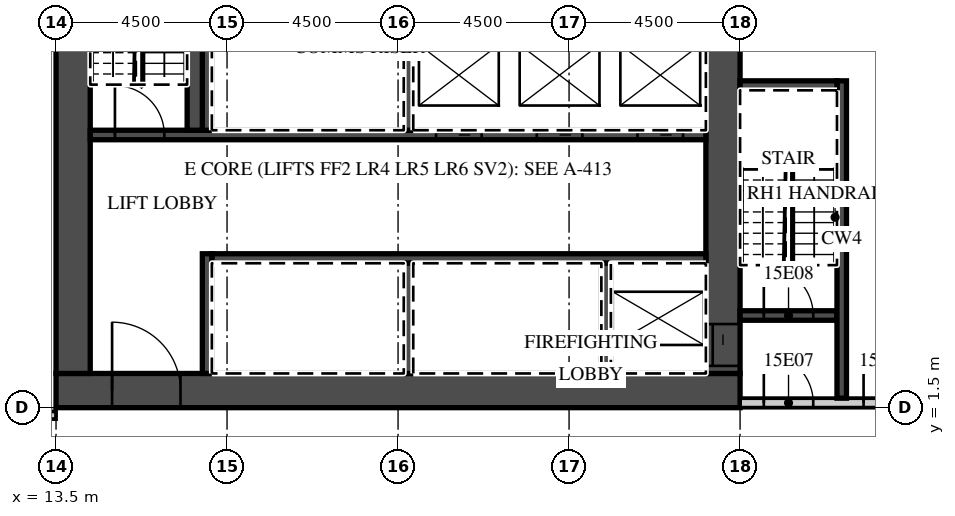
"""IFC4 building model, lengths in metres.
Left out: names, types, materials, properties, quantities, classifications, styles, units other than length and angle.
Written with IfcOpenShell. Run it as: python <this file> out.ifc"""

import sys

from ifc_helpers import new_model, si_unit, direction, frame, frame_2d, origin, place, context, subcontext, project, spatial, rectangle, extrude, element, fill, save


model = new_model("IFC4")
c1 = context("Model", 3, precision=1e-05, world=origin(), true_north=direction((0.0, 1.0)))
c2 = subcontext(c1, "Body", "Model", "MODEL_VIEW")
j1 = project(units=[si_unit("LENGTHUNIT", "METRE"), si_unit("PLANEANGLEUNIT", "RADIAN")], contexts=[c1])
p1 = place(None, origin())
s1 = spatial("IfcSite", under=j1, at=p1, CompositionType="ELEMENT")
p2 = place(p1, origin())
s2 = spatial("IfcBuilding", under=s1, at=p2, CompositionType="ELEMENT")
p3 = place(p2, frame((0.0, 0.0, 79.8)))
s3 = spatial("IfcBuildingStorey", under=s2, at=p3, CompositionType="ELEMENT", Elevation=79.8)
p4 = place(p3, frame((-44.55, 1.3, 0.0), z_axis=(0.0, 0.0, 1.0), x_axis=(1.0, 0.0, 0.0)))
e1 = element("IfcWall", 1, at=p4, inside=s3, PredefinedType="PARTITIONING", context=c2, shape_type="SweptSolid", body=[
    extrude(rectangle(XDim=58.05, YDim=0.2, at=frame_2d((29.025, 0.0))), origin(), (0.0, 0.0, 1.0), 3.02),
])
p5 = place(p4, frame((0.525, 0.0, 0.0)))
e2 = element("IfcOpeningElement", 2, at=p5, cuts=e1, PredefinedType="OPENING", context=c2, shape_type="SweptSolid", body=[
    extrude(rectangle(XDim=1.0, YDim=2.1, at=frame_2d((0.5, 1.05))), frame((0.0, 0.11, 0.0), z_axis=(0.0, -1.0, 0.0), x_axis=(1.0, 0.0, 0.0)), (0.0, 0.0, 1.0), 0.22),
])
p6 = place(p4, frame((4.625, 0.0, 0.0)))
e3 = element("IfcOpeningElement", 3, at=p6, cuts=e1, PredefinedType="OPENING", context=c2, shape_type="SweptSolid", body=[
    extrude(rectangle(XDim=1.0, YDim=2.1, at=frame_2d((0.5, 1.05))), frame((0.0, 0.11, 0.0), z_axis=(0.0, -1.0, 0.0), x_axis=(1.0, 0.0, 0.0)), (0.0, 0.0, 1.0), 0.22),
])
p7 = place(p4, frame((10.987, 0.0, 0.0)))
e4 = element("IfcOpeningElement", 4, at=p7, cuts=e1, PredefinedType="OPENING", context=c2, shape_type="SweptSolid", body=[
    extrude(rectangle(XDim=1.2, YDim=2.1, at=frame_2d((0.6, 1.05))), frame((0.0, 0.11, 0.0), z_axis=(0.0, -1.0, 0.0), x_axis=(1.0, 0.0, 0.0)), (0.0, 0.0, 1.0), 0.22),
])
p8 = place(p4, frame((19.987, 0.0, 0.0)))
e5 = element("IfcOpeningElement", 5, at=p8, cuts=e1, PredefinedType="OPENING", context=c2, shape_type="SweptSolid", body=[
    extrude(rectangle(XDim=1.2, YDim=2.1, at=frame_2d((0.6, 1.05))), frame((0.0, 0.11, 0.0), z_axis=(0.0, -1.0, 0.0), x_axis=(1.0, 0.0, 0.0)), (0.0, 0.0, 1.0), 0.22),
])
p9 = place(p4, frame((28.987, 0.0, 0.0)))
e6 = element("IfcOpeningElement", 6, at=p9, cuts=e1, PredefinedType="OPENING", context=c2, shape_type="SweptSolid", body=[
    extrude(rectangle(XDim=1.2, YDim=2.1, at=frame_2d((0.6, 1.05))), frame((0.0, 0.11, 0.0), z_axis=(0.0, -1.0, 0.0), x_axis=(1.0, 0.0, 0.0)), (0.0, 0.0, 1.0), 0.22),
])
p10 = place(p4, frame((36.125, 0.0, 0.0)))
e7 = element("IfcOpeningElement", 7, at=p10, cuts=e1, PredefinedType="OPENING", context=c2, shape_type="SweptSolid", body=[
    extrude(rectangle(XDim=1.0, YDim=2.1, at=frame_2d((0.5, 1.05))), frame((0.0, 0.11, 0.0), z_axis=(0.0, -1.0, 0.0), x_axis=(1.0, 0.0, 0.0)), (0.0, 0.0, 1.0), 0.22),
])
p11 = place(p4, frame((42.975, 0.0, 0.0)))
e8 = element("IfcOpeningElement", 8, at=p11, cuts=e1, PredefinedType="OPENING", context=c2, shape_type="SweptSolid", body=[
    extrude(rectangle(XDim=1.0, YDim=2.1, at=frame_2d((0.5, 1.05))), frame((0.0, 0.11, 0.0), z_axis=(0.0, -1.0, 0.0), x_axis=(1.0, 0.0, 0.0)), (0.0, 0.0, 1.0), 0.22),
])
p12 = place(p4, frame((46.987, 0.0, 0.0)))
e9 = element("IfcOpeningElement", 9, at=p12, cuts=e1, PredefinedType="OPENING", context=c2, shape_type="SweptSolid", body=[
    extrude(rectangle(XDim=1.2, YDim=2.1, at=frame_2d((0.6, 1.05))), frame((0.0, 0.11, 0.0), z_axis=(0.0, -1.0, 0.0), x_axis=(1.0, 0.0, 0.0)), (0.0, 0.0, 1.0), 0.22),
])
p13 = place(p4, frame((56.475, 0.0, 0.0)))
e10 = element("IfcOpeningElement", 10, at=p13, cuts=e1, PredefinedType="OPENING", context=c2, shape_type="SweptSolid", body=[
    extrude(rectangle(XDim=1.0, YDim=2.1, at=frame_2d((0.5, 1.05))), frame((0.0, 0.11, 0.0), z_axis=(0.0, -1.0, 0.0), x_axis=(1.0, 0.0, 0.0)), (0.0, 0.0, 1.0), 0.22),
])
p14 = place(p3, frame((13.5, 1.95, 0.0), z_axis=(0.0, 0.0, 1.0), x_axis=(1.0, 0.0, 0.0)))
e11 = element("IfcWall", 11, at=p14, inside=s3, PredefinedType="SHEAR", context=c2, shape_type="SweptSolid", body=[
    extrude(rectangle(XDim=18.0, YDim=0.9, at=frame_2d((9.0, 0.0))), origin(), (0.0, 0.0, 1.0), 3.02),
])
p15 = place(p14, frame((1.475, 0.0, 0.0)))
e12 = element("IfcOpeningElement", 12, at=p15, cuts=e11, PredefinedType="OPENING", context=c2, shape_type="SweptSolid", body=[
    extrude(rectangle(XDim=1.8, YDim=2.1, at=frame_2d((0.9, 1.05))), frame((0.0, 0.46, 0.0), z_axis=(0.0, -1.0, 0.0), x_axis=(1.0, 0.0, 0.0)), (0.0, 0.0, 1.0), 0.92),
])
p16 = place(p3, frame((31.05, 2.4, 0.0), z_axis=(0.0, 0.0, 1.0), x_axis=(0.0, 1.0, 0.0)))
e13 = element("IfcWall", 13, at=p16, inside=s3, PredefinedType="SHEAR", context=c2, shape_type="SweptSolid", body=[
    extrude(rectangle(XDim=12.8, YDim=0.9, at=frame_2d((6.4, 0.0))), origin(), (0.0, 0.0, 1.0), 3.02),
])
p17 = place(p16, frame((0.2, 0.0, 0.0)))
e14 = element("IfcOpeningElement", 14, at=p17, cuts=e13, PredefinedType="OPENING", context=c2, shape_type="SweptSolid", body=[
    extrude(rectangle(XDim=1.1, YDim=2.1, at=frame_2d((0.55, 1.05))), frame((0.0, 0.46, 0.0), z_axis=(0.0, -1.0, 0.0), x_axis=(1.0, 0.0, 0.0)), (0.0, 0.0, 1.0), 0.92),
])
p18 = place(p3, frame((13.95, 2.4, 0.0), z_axis=(0.0, 0.0, 1.0), x_axis=(0.0, 1.0, 0.0)))
e15 = element("IfcWall", 15, at=p18, inside=s3, PredefinedType="SHEAR", context=c2, shape_type="SweptSolid", body=[
    extrude(rectangle(XDim=12.2, YDim=0.9, at=frame_2d((6.1, 0.0))), origin(), (0.0, 0.0, 1.0), 3.02),
])
p19 = place(p3, frame((17.6, 5.425, 0.0), z_axis=(0.0, 0.0, 1.0), x_axis=(1.0, 0.0, 0.0)))
e16 = element("IfcWall", 16, at=p19, inside=s3, PredefinedType="SHEAR", context=c2, shape_type="SweptSolid", body=[
    extrude(rectangle(XDim=13.0, YDim=0.25, at=frame_2d((6.5, 0.0))), origin(), (0.0, 0.0, 1.0), 3.02),
])
p20 = place(p3, frame((17.475, 2.4, 0.0), z_axis=(0.0, 0.0, 1.0), x_axis=(0.0, 1.0, 0.0)))
e17 = element("IfcWall", 17, at=p20, inside=s3, PredefinedType="SHEAR", context=c2, shape_type="SweptSolid", body=[
    extrude(rectangle(XDim=3.15, YDim=0.25, at=frame_2d((1.575, 0.0))), origin(), (0.0, 0.0, 1.0), 3.02),
])
for number, where, z_axis, x_axis in (
    (18, (27.975, 2.4, 0.0), (0.0, 0.0, 1.0), (0.0, 1.0, 0.0)),
    (19, (22.775, 2.4, 0.0), (0.0, 0.0, 1.0), (0.0, 1.0, 0.0)),
):
    element("IfcWall", number, at=place(p3, frame(where, z_axis=z_axis, x_axis=x_axis)), inside=s3, PredefinedType="SHEAR", context=c2, shape_type="SweptSolid", body=[
        extrude(rectangle(XDim=2.9, YDim=0.25, at=frame_2d((1.45, 0.0))), origin(), (0.0, 0.0, 1.0), 3.02),
    ])
p21 = place(p3, frame((14.4, 8.675, 0.0), z_axis=(0.0, 0.0, 1.0), x_axis=(1.0, 0.0, 0.0)))
e20 = element("IfcWall", 20, at=p21, inside=s3, PredefinedType="SHEAR", context=c2, shape_type="SweptSolid", body=[
    extrude(rectangle(XDim=16.2, YDim=0.25, at=frame_2d((8.1, 0.0))), origin(), (0.0, 0.0, 1.0), 3.02),
])
p22 = place(p21, frame((14.4, 0.0, 0.0)))
e21 = element("IfcOpeningElement", 21, at=p22, cuts=e20, PredefinedType="OPENING", context=c2, shape_type="SweptSolid", body=[
    extrude(rectangle(XDim=1.2, YDim=2.1, at=frame_2d((0.6, 1.05))), frame((0.0, 0.135, 0.0), z_axis=(0.0, -1.0, 0.0), x_axis=(1.0, 0.0, 0.0)), (0.0, 0.0, 1.0), 0.27),
])
p23 = place(p21, frame((11.75, 0.0, 0.0)))
e22 = element("IfcOpeningElement", 22, at=p23, cuts=e20, PredefinedType="OPENING", context=c2, shape_type="SweptSolid", body=[
    extrude(rectangle(XDim=1.2, YDim=2.1, at=frame_2d((0.6, 1.05))), frame((0.0, 0.135, 0.0), z_axis=(0.0, -1.0, 0.0), x_axis=(1.0, 0.0, 0.0)), (0.0, 0.0, 1.0), 0.27),
])
p24 = place(p21, frame((9.1, 0.0, 0.0)))
e23 = element("IfcOpeningElement", 23, at=p24, cuts=e20, PredefinedType="OPENING", context=c2, shape_type="SweptSolid", body=[
    extrude(rectangle(XDim=1.2, YDim=2.1, at=frame_2d((0.6, 1.05))), frame((0.0, 0.135, 0.0), z_axis=(0.0, -1.0, 0.0), x_axis=(1.0, 0.0, 0.0)), (0.0, 0.0, 1.0), 0.27),
])
p25 = place(p21, frame((0.65, 0.0, 0.0)))
e24 = element("IfcOpeningElement", 24, at=p25, cuts=e20, PredefinedType="OPENING", context=c2, shape_type="SweptSolid", body=[
    extrude(rectangle(XDim=1.3, YDim=2.1, at=frame_2d((0.65, 1.05))), frame((0.0, 0.135, 0.0), z_axis=(0.0, -1.0, 0.0), x_axis=(1.0, 0.0, 0.0)), (0.0, 0.0, 1.0), 0.27),
])
for number, where, z_axis, x_axis in (
    (25, (17.475, 8.8, 0.0), (0.0, 0.0, 1.0), (0.0, 1.0, 0.0)),
    (26, (22.775, 8.8, 0.0), (0.0, 0.0, 1.0), (0.0, 1.0, 0.0)),
):
    element("IfcWall", number, at=place(p3, frame(where, z_axis=z_axis, x_axis=x_axis)), inside=s3, PredefinedType="SHEAR", context=c2, shape_type="SweptSolid", body=[
        extrude(rectangle(XDim=2.9, YDim=0.25, at=frame_2d((1.45, 0.0))), origin(), (0.0, 0.0, 1.0), 3.02),
    ])
p26 = place(p3, frame((17.15, 8.8, 0.0), z_axis=(0.0, 0.0, 1.0), x_axis=(0.0, 1.0, 0.0)))
e27 = element("IfcWall", 27, at=p26, inside=s3, PredefinedType="SHEAR", context=c2, shape_type="SweptSolid", body=[
    extrude(rectangle(XDim=5.8, YDim=0.4, at=frame_2d((2.9, 0.0))), origin(), (0.0, 0.0, 1.0), 3.02),
])
p27 = place(p3, frame((31.5, 1.625, 0.0), z_axis=(0.0, 0.0, 1.0), x_axis=(1.0, 0.0, 0.0)))
e28 = element("IfcWall", 28, at=p27, inside=s3, PredefinedType="PARTITIONING", context=c2, shape_type="SweptSolid", body=[
    extrude(rectangle(XDim=13.05, YDim=0.25, at=frame_2d((6.525, 0.0))), origin(), (0.0, 0.0, 1.0), 3.02),
])
p28 = place(p27, frame((0.625, 0.0, 0.0)))
e29 = element("IfcOpeningElement", 29, at=p28, cuts=e28, PredefinedType="OPENING", context=c2, shape_type="SweptSolid", body=[
    extrude(rectangle(XDim=1.3, YDim=2.1, at=frame_2d((0.65, 1.05))), frame((0.0, 0.135, 0.0), z_axis=(0.0, -1.0, 0.0), x_axis=(1.0, 0.0, 0.0)), (0.0, 0.0, 1.0), 0.27),
])
p29 = place(p27, frame((3.25, 0.0, 0.0)))
e30 = element("IfcOpeningElement", 30, at=p29, cuts=e28, PredefinedType="OPENING", context=c2, shape_type="SweptSolid", body=[
    extrude(rectangle(XDim=1.1, YDim=2.1, at=frame_2d((0.55, 1.05))), frame((0.0, 0.135, 0.0), z_axis=(0.0, -1.0, 0.0), x_axis=(1.0, 0.0, 0.0)), (0.0, 0.0, 1.0), 0.27),
])
p30 = place(p3, frame((31.5, 3.925, 0.0), z_axis=(0.0, 0.0, 1.0), x_axis=(1.0, 0.0, 0.0)))
e31 = element("IfcWall", 31, at=p30, inside=s3, PredefinedType="SHEAR", context=c2, shape_type="SweptSolid", body=[
    extrude(rectangle(XDim=2.55, YDim=0.25, at=frame_2d((1.275, 0.0))), origin(), (0.0, 0.0, 1.0), 3.02),
])
p31 = place(p30, frame((0.625, 0.0, 0.0)))
e32 = element("IfcOpeningElement", 32, at=p31, cuts=e31, PredefinedType="OPENING", context=c2, shape_type="SweptSolid", body=[
    extrude(rectangle(XDim=1.3, YDim=2.1, at=frame_2d((0.65, 1.05))), frame((0.0, 0.135, 0.0), z_axis=(0.0, -1.0, 0.0), x_axis=(1.0, 0.0, 0.0)), (0.0, 0.0, 1.0), 0.27),
])
p32 = place(p3, frame((34.175, 1.75, 0.0), z_axis=(0.0, 0.0, 1.0), x_axis=(0.0, 1.0, 0.0)))
e33 = element("IfcWall", 33, at=p32, inside=s3, PredefinedType="SHEAR", context=c2, shape_type="SweptSolid", body=[
    extrude(rectangle(XDim=8.35, YDim=0.25, at=frame_2d((4.175, 0.0))), origin(), (0.0, 0.0, 1.0), 3.02),
])
p33 = place(p3, frame((31.5, 9.975, 0.0), z_axis=(0.0, 0.0, 1.0), x_axis=(1.0, 0.0, 0.0)))
e34 = element("IfcWall", 34, at=p33, inside=s3, PredefinedType="SHEAR", context=c2, shape_type="SweptSolid", body=[
    extrude(rectangle(XDim=2.55, YDim=0.25, at=frame_2d((1.275, 0.0))), origin(), (0.0, 0.0, 1.0), 3.02),
])
p34 = place(p22, origin())
e35 = element("IfcDoor", 35, at=p34, inside=s3, OperationType="SLIDING_TO_LEFT", PredefinedType="DOOR", context=c2, shape_type="SweptSolid", body=[
    extrude(rectangle(XDim=1.2, YDim=2.1, at=frame_2d((0.6, 1.05))), frame((0.0, 0.025, 0.0), z_axis=(0.0, -1.0, 0.0), x_axis=(1.0, 0.0, 0.0)), (0.0, 0.0, 1.0), 0.05),
])
fill(e21, e35)
p35 = place(p23, origin())
e36 = element("IfcDoor", 36, at=p35, inside=s3, OperationType="SLIDING_TO_RIGHT", PredefinedType="DOOR", context=c2, shape_type="SweptSolid", body=[
    extrude(rectangle(XDim=1.2, YDim=2.1, at=frame_2d((0.6, 1.05))), frame((0.0, 0.025, 0.0), z_axis=(0.0, -1.0, 0.0), x_axis=(1.0, 0.0, 0.0)), (0.0, 0.0, 1.0), 0.05),
])
fill(e22, e36)
p36 = place(p24, origin())
e37 = element("IfcDoor", 37, at=p36, inside=s3, OperationType="SLIDING_TO_RIGHT", PredefinedType="DOOR", context=c2, shape_type="SweptSolid", body=[
    extrude(rectangle(XDim=1.2, YDim=2.1, at=frame_2d((0.6, 1.05))), frame((0.0, 0.025, 0.0), z_axis=(0.0, -1.0, 0.0), x_axis=(1.0, 0.0, 0.0)), (0.0, 0.0, 1.0), 0.05),
])
fill(e23, e37)
p37 = place(p17, origin())
e38 = element("IfcDoor", 38, at=p37, inside=s3, OperationType="SLIDING_TO_LEFT", PredefinedType="DOOR", context=c2, shape_type="SweptSolid", body=[
    extrude(rectangle(XDim=1.1, YDim=2.1, at=frame_2d((0.55, 1.05))), frame((0.0, 0.025, 0.0), z_axis=(0.0, -1.0, 0.0), x_axis=(1.0, 0.0, 0.0)), (0.0, 0.0, 1.0), 0.05),
])
fill(e14, e38)
p38 = place(p15, origin())
e39 = element("IfcDoor", 39, at=p38, inside=s3, OperationType="DOUBLE_DOOR_DOUBLE_SWING", PredefinedType="DOOR", context=c2, shape_type="SweptSolid", body=[
    extrude(rectangle(XDim=1.8, YDim=2.1, at=frame_2d((0.9, 1.05))), frame((0.0, 0.025, 0.0), z_axis=(0.0, -1.0, 0.0), x_axis=(1.0, 0.0, 0.0)), (0.0, 0.0, 1.0), 0.05),
])
fill(e12, e39)
p39 = place(p28, origin())
e40 = element("IfcDoor", 40, at=p39, inside=s3, OperationType="SINGLE_SWING_LEFT", PredefinedType="DOOR", context=c2, shape_type="SweptSolid", body=[
    extrude(rectangle(XDim=1.3, YDim=2.1, at=frame_2d((0.65, 1.05))), frame((0.0, 0.025, 0.0), z_axis=(0.0, -1.0, 0.0), x_axis=(1.0, 0.0, 0.0)), (0.0, 0.0, 1.0), 0.05),
])
fill(e29, e40)
p40 = place(p31, origin())
e41 = element("IfcDoor", 41, at=p40, inside=s3, OperationType="SINGLE_SWING_LEFT", PredefinedType="DOOR", context=c2, shape_type="SweptSolid", body=[
    extrude(rectangle(XDim=1.3, YDim=2.1, at=frame_2d((0.65, 1.05))), frame((0.0, 0.025, 0.0), z_axis=(0.0, -1.0, 0.0), x_axis=(1.0, 0.0, 0.0)), (0.0, 0.0, 1.0), 0.05),
])
fill(e32, e41)
p41 = place(p29, origin())
e42 = element("IfcDoor", 42, at=p41, inside=s3, OperationType="SINGLE_SWING_LEFT", PredefinedType="DOOR", context=c2, shape_type="SweptSolid", body=[
    extrude(rectangle(XDim=1.1, YDim=2.1, at=frame_2d((0.55, 1.05))), frame((0.0, 0.025, 0.0), z_axis=(0.0, -1.0, 0.0), x_axis=(1.0, 0.0, 0.0)), (0.0, 0.0, 1.0), 0.05),
])
fill(e30, e42)
p42 = place(p25, origin())
e43 = element("IfcDoor", 43, at=p42, inside=s3, OperationType="SINGLE_SWING_LEFT", PredefinedType="DOOR", context=c2, shape_type="SweptSolid", body=[
    extrude(rectangle(XDim=1.3, YDim=2.1, at=frame_2d((0.65, 1.05))), frame((0.0, 0.025, 0.0), z_axis=(0.0, -1.0, 0.0), x_axis=(1.0, 0.0, 0.0)), (0.0, 0.0, 1.0), 0.05),
])
fill(e24, e43)
save(model, sys.argv[1])
